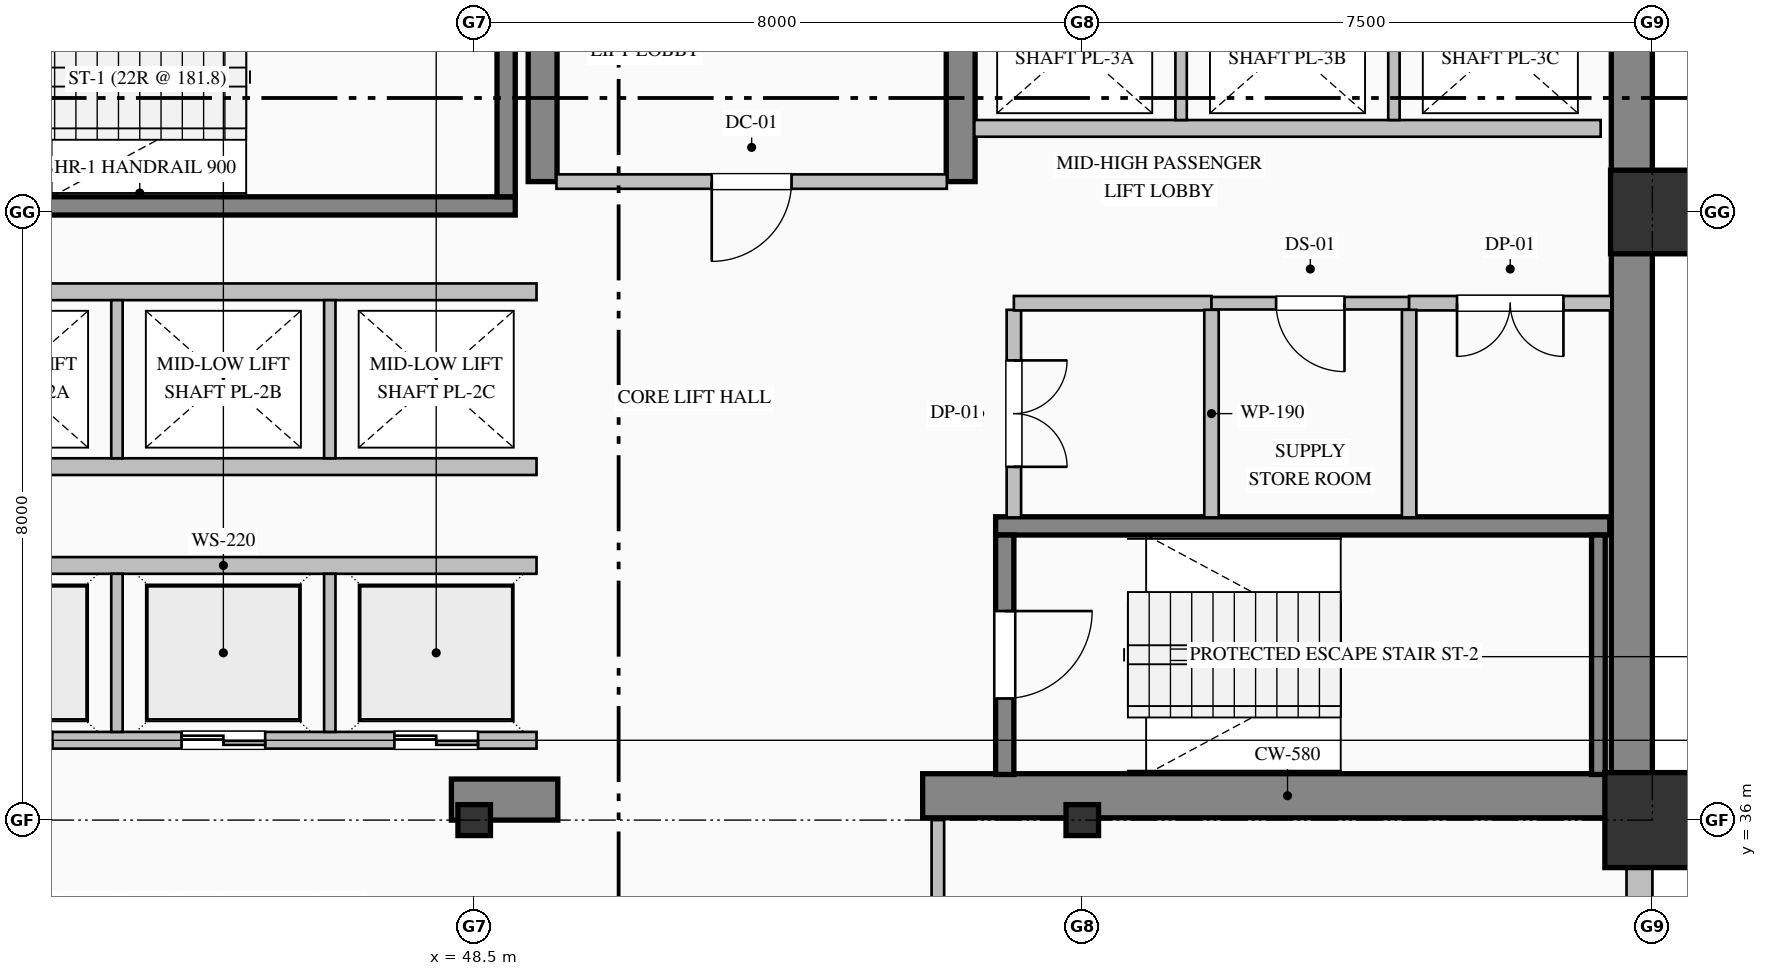
"""IFC4 building model, lengths in metres.
Left out: names, types, materials, properties, quantities, classifications, styles, units other than length and angle.
Written with IfcOpenShell. Run it as: python <this file> out.ifc"""

import sys

from ifc_helpers import new_model, si_unit, direction, frame, frame_2d, origin, origin_2d, place, context, subcontext, project, spatial, rectangle, hollow_rectangle, i_section, extrude, element, fill, save


model = new_model("IFC4")
c1 = context("Model", 3, precision=1e-05, world=origin(), true_north=direction((0.0, 1.0)))
c2 = subcontext(c1, "Body", "Model", "MODEL_VIEW")
j1 = project(units=[si_unit("LENGTHUNIT", "METRE"), si_unit("PLANEANGLEUNIT", "RADIAN")], contexts=[c1])
p1 = place(None, origin())
s1 = spatial("IfcSite", under=j1, at=p1, CompositionType="ELEMENT")
p2 = place(p1, origin())
s2 = spatial("IfcBuilding", under=s1, at=p2, CompositionType="ELEMENT")
p3 = place(p2, frame((0.0, 0.0, 44.2)))
s3 = spatial("IfcBuildingStorey", under=s2, at=p3, CompositionType="ELEMENT", Elevation=44.2)
p4 = place(p3, frame((63.73, 36.32, 0.0), z_axis=(0.0, 0.0, 1.0), x_axis=(0.0, 1.0, 0.0)))
e1 = element("IfcWall", 1, at=p4, inside=s3, PredefinedType="SHEAR", context=c2, shape_type="SweptSolid", body=[
    extrude(rectangle(XDim=15.14, YDim=0.54, at=frame_2d((7.57, 0.0))), origin(), (0.0, 0.0, 1.0), 3.75),
])
p5 = place(p3, frame((48.2, 36.27, 0.0), z_axis=(0.0, 0.0, 1.0), x_axis=(1.0, 0.0, 0.0)))
e2 = element("IfcWall", 2, at=p5, inside=s3, PredefinedType="SHEAR", context=c2, shape_type="SweptSolid", body=[
    extrude(rectangle(XDim=1.4, YDim=0.54, at=frame_2d((0.7, 0.0))), origin(), (0.0, 0.0, 1.0), 3.75),
])
p6 = place(p3, frame((54.4, 36.32, 0.0), z_axis=(0.0, 0.0, 1.0), x_axis=(1.0, 0.0, 0.0)))
e3 = element("IfcWall", 3, at=p6, inside=s3, PredefinedType="SHEAR", context=c2, shape_type="SweptSolid", body=[
    extrude(rectangle(XDim=9.6, YDim=0.58, at=frame_2d((4.8, 0.0))), origin(), (0.0, 0.0, 1.0), 4.0),
])
p7 = place(p3, frame((49.4, 44.4, 0.0), z_axis=(0.0, 0.0, 1.0), x_axis=(0.0, 1.0, 0.0)))
e4 = element("IfcWall", 4, at=p7, inside=s3, PredefinedType="SHEAR", context=c2, shape_type="SweptSolid", body=[
    extrude(rectangle(XDim=3.0, YDim=0.38, at=frame_2d((1.5, 0.0))), origin(), (0.0, 0.0, 1.0), 3.75),
])
p8 = place(p3, frame((54.9, 44.4, 0.0), z_axis=(0.0, 0.0, 1.0), x_axis=(0.0, 1.0, 0.0)))
e5 = element("IfcWall", 5, at=p8, inside=s3, PredefinedType="SHEAR", context=c2, shape_type="SweptSolid", body=[
    extrude(rectangle(XDim=7.06, YDim=0.38, at=frame_2d((3.53, 0.0))), origin(), (0.0, 0.0, 1.0), 3.75),
])
for number, where, z_axis, x_axis in (
    (6, (48.5, 36.0, 0.0), (0.0, 0.0, 1.0), (1.0, 0.0, 0.0)),
    (7, (56.5, 36.0, 0.0), (0.0, 0.0, 1.0), (1.0, 0.0, 0.0)),
):
    element("IfcColumn", number, at=place(p3, frame(where, z_axis=z_axis, x_axis=x_axis)), inside=s3, PredefinedType="COLUMN", context=c2, shape_type="SweptSolid", body=[
        extrude(i_section(OverallWidth=0.407, OverallDepth=0.428, WebThickness=0.02, FlangeThickness=0.035, FilletRadius=0.022, at=origin_2d()), origin(), (0.0, 0.0, 1.0), 4.0),
    ])
p9 = place(p3, frame((64.0, 36.0, 0.0), z_axis=(0.0, 0.0, 1.0), x_axis=(1.0, 0.0, 0.0)))
e8 = element("IfcColumn", 8, at=p9, inside=s3, PredefinedType="COLUMN", context=c2, shape_type="SweptSolid", body=[
    extrude(hollow_rectangle(XDim=1.25, YDim=1.25, WallThickness=0.045, at=origin_2d()), origin(), (0.0, 0.0, 1.0), 4.0),
])
p10 = place(p3, frame((64.0, 44.0, 0.0), z_axis=(0.0, 0.0, 1.0), x_axis=(1.0, 0.0, 0.0)))
e9 = element("IfcColumn", 9, at=p10, inside=s3, PredefinedType="COLUMN", context=c2, shape_type="SweptSolid", body=[
    extrude(hollow_rectangle(XDim=1.1, YDim=1.1, WallThickness=0.04, at=origin_2d()), origin(), (0.0, 0.0, 1.0), 4.0),
])
p11 = place(p3, frame((63.83, 36.05, 0.0), z_axis=(0.0, 0.0, 1.0), x_axis=(0.0, -1.0, 0.0)))
e10 = element("IfcWall", 10, at=p11, inside=s3, PredefinedType="SOLIDWALL", context=c2, shape_type="SweptSolid", body=[
    extrude(rectangle(XDim=28.05, YDim=0.34, at=frame_2d((14.025, 0.0))), origin(), (0.0, 0.0, 1.0), 3.25),
])
p12 = place(p11, frame((2.55, 0.0, 0.85)))
e11 = element("IfcOpeningElement", 11, at=p12, cuts=e10, PredefinedType="OPENING", context=c2, shape_type="SweptSolid", body=[
    extrude(rectangle(XDim=2.1, YDim=2.05, at=frame_2d((1.05, 1.025))), frame((0.0, 0.18, 0.0), z_axis=(0.0, -1.0, 0.0), x_axis=(1.0, 0.0, 0.0)), (0.0, 0.0, 1.0), 0.36),
])
p13 = place(p11, frame((9.9, 0.0, 0.85)))
e12 = element("IfcOpeningElement", 12, at=p13, cuts=e10, PredefinedType="OPENING", context=c2, shape_type="SweptSolid", body=[
    extrude(rectangle(XDim=1.8, YDim=2.05, at=frame_2d((0.9, 1.025))), frame((0.0, 0.18, 0.0), z_axis=(0.0, -1.0, 0.0), x_axis=(1.0, 0.0, 0.0)), (0.0, 0.0, 1.0), 0.36),
])
p14 = place(p11, frame((13.35, 0.0, 0.85)))
e13 = element("IfcOpeningElement", 13, at=p14, cuts=e10, PredefinedType="OPENING", context=c2, shape_type="SweptSolid", body=[
    extrude(rectangle(XDim=2.1, YDim=2.05, at=frame_2d((1.05, 1.025))), frame((0.0, 0.18, 0.0), z_axis=(0.0, -1.0, 0.0), x_axis=(1.0, 0.0, 0.0)), (0.0, 0.0, 1.0), 0.36),
])
p15 = place(p3, frame((49.04, 44.08, 0.0), z_axis=(0.0, 0.0, 1.0), x_axis=(-1.0, 0.0, 0.0)))
e14 = element("IfcWall", 14, at=p15, inside=s3, PredefinedType="SOLIDWALL", context=c2, shape_type="SweptSolid", body=[
    extrude(rectangle(XDim=8.08, YDim=0.24, at=frame_2d((4.04, 0.0))), origin(), (0.0, 0.0, 1.0), 4.0),
])
p16 = place(p3, frame((48.92, 44.2, 0.0), z_axis=(0.0, 0.0, 1.0), x_axis=(0.0, 1.0, 0.0)))
e15 = element("IfcWall", 15, at=p16, inside=s3, PredefinedType="SOLIDWALL", context=c2, shape_type="SweptSolid", body=[
    extrude(rectangle(XDim=3.15, YDim=0.24, at=frame_2d((1.575, 0.0))), origin(), (0.0, 0.0, 1.0), 4.0),
])
p17 = place(p3, frame((55.36, 39.87, 0.0), z_axis=(0.0, 0.0, 1.0), x_axis=(1.0, 0.0, 0.0)))
e16 = element("IfcWall", 16, at=p17, inside=s3, PredefinedType="SOLIDWALL", context=c2, shape_type="SweptSolid", body=[
    extrude(rectangle(XDim=8.08, YDim=0.24, at=frame_2d((4.04, 0.0))), origin(), (0.0, 0.0, 1.0), 4.0),
])
p18 = place(p3, frame((55.48, 39.75, 0.0), z_axis=(0.0, 0.0, 1.0), x_axis=(0.0, -1.0, 0.0)))
e17 = element("IfcWall", 17, at=p18, inside=s3, PredefinedType="SOLIDWALL", context=c2, shape_type="SweptSolid", body=[
    extrude(rectangle(XDim=3.15, YDim=0.24, at=frame_2d((1.575, 0.0))), origin(), (0.0, 0.0, 1.0), 4.0),
])
p19 = place(p18, frame((1.0, 0.0, 0.0)))
e18 = element("IfcOpeningElement", 18, at=p19, cuts=e17, PredefinedType="OPENING", context=c2, shape_type="SweptSolid", body=[
    extrude(rectangle(XDim=1.15, YDim=2.2, at=frame_2d((0.575, 1.1))), frame((0.0, 0.13, 0.0), z_axis=(0.0, -1.0, 0.0), x_axis=(1.0, 0.0, 0.0)), (0.0, 0.0, 1.0), 0.26),
])
p20 = place(p3, frame((63.29, 36.6, 0.0), z_axis=(0.0, 0.0, 1.0), x_axis=(0.0, 1.0, 0.0)))
e19 = element("IfcWall", 19, at=p20, inside=s3, PredefinedType="SOLIDWALL", context=c2, shape_type="SweptSolid", body=[
    extrude(rectangle(XDim=3.15, YDim=0.18, at=frame_2d((1.575, 0.0))), origin(), (0.0, 0.0, 1.0), 4.0),
])
p21 = place(p3, frame((49.32, 37.05, 0.0), z_axis=(0.0, 0.0, 1.0), x_axis=(-1.0, 0.0, 0.0)))
e20 = element("IfcWall", 20, at=p21, inside=s3, PredefinedType="PARTITIONING", context=c2, shape_type="SweptSolid", body=[
    extrude(rectangle(XDim=8.24, YDim=0.22, at=frame_2d((4.12, 0.0))), origin(), (0.0, 0.0, 1.0), 3.75),
])
p22 = place(p21, frame((6.37, 0.0, 0.0)))
e21 = element("IfcOpeningElement", 21, at=p22, cuts=e20, PredefinedType="OPENING", context=c2, shape_type="SweptSolid", body=[
    extrude(rectangle(XDim=1.1, YDim=2.2, at=frame_2d((0.55, 1.1))), frame((0.0, 0.12, 0.0), z_axis=(0.0, -1.0, 0.0), x_axis=(1.0, 0.0, 0.0)), (0.0, 0.0, 1.0), 0.24),
])
p23 = place(p21, frame((3.57, 0.0, 0.0)))
e22 = element("IfcOpeningElement", 22, at=p23, cuts=e20, PredefinedType="OPENING", context=c2, shape_type="SweptSolid", body=[
    extrude(rectangle(XDim=1.1, YDim=2.2, at=frame_2d((0.55, 1.1))), frame((0.0, 0.12, 0.0), z_axis=(0.0, -1.0, 0.0), x_axis=(1.0, 0.0, 0.0)), (0.0, 0.0, 1.0), 0.24),
])
p24 = place(p21, frame((0.77, 0.0, 0.0)))
e23 = element("IfcOpeningElement", 23, at=p24, cuts=e20, PredefinedType="OPENING", context=c2, shape_type="SweptSolid", body=[
    extrude(rectangle(XDim=1.1, YDim=2.2, at=frame_2d((0.55, 1.1))), frame((0.0, 0.12, 0.0), z_axis=(0.0, -1.0, 0.0), x_axis=(1.0, 0.0, 0.0)), (0.0, 0.0, 1.0), 0.24),
])
p25 = place(p3, frame((41.08, 39.35, 0.0), z_axis=(0.0, 0.0, 1.0), x_axis=(1.0, 0.0, 0.0)))
e24 = element("IfcWall", 24, at=p25, inside=s3, PredefinedType="PARTITIONING", context=c2, shape_type="SweptSolid", body=[
    extrude(rectangle(XDim=8.24, YDim=0.22, at=frame_2d((4.12, 0.0))), origin(), (0.0, 0.0, 1.0), 3.75),
])
for number, where, z_axis, x_axis in (
    (25, (43.8, 37.16, 0.0), (0.0, 0.0, 1.0), (0.0, 1.0, 0.0)),
    (26, (46.6, 37.16, 0.0), (0.0, 0.0, 1.0), (0.0, 1.0, 0.0)),
):
    element("IfcWall", number, at=place(p3, frame(where, z_axis=z_axis, x_axis=x_axis)), inside=s3, PredefinedType="PARTITIONING", context=c2, shape_type="SweptSolid", body=[
        extrude(rectangle(XDim=2.08, YDim=0.15, at=frame_2d((1.04, 0.0))), origin(), (0.0, 0.0, 1.0), 3.75),
    ])
for number, where, z_axis, x_axis in (
    (27, (49.32, 40.65, 0.0), (0.0, 0.0, 1.0), (-1.0, 0.0, 0.0)),
    (28, (41.08, 42.95, 0.0), (0.0, 0.0, 1.0), (1.0, 0.0, 0.0)),
):
    element("IfcWall", number, at=place(p3, frame(where, z_axis=z_axis, x_axis=x_axis)), inside=s3, PredefinedType="PARTITIONING", context=c2, shape_type="SweptSolid", body=[
        extrude(rectangle(XDim=8.24, YDim=0.22, at=frame_2d((4.12, 0.0))), origin(), (0.0, 0.0, 1.0), 3.75),
    ])
for number, where, z_axis, x_axis in (
    (29, (43.8, 40.76, 0.0), (0.0, 0.0, 1.0), (0.0, 1.0, 0.0)),
    (30, (46.6, 40.76, 0.0), (0.0, 0.0, 1.0), (0.0, 1.0, 0.0)),
):
    element("IfcWall", number, at=place(p3, frame(where, z_axis=z_axis, x_axis=x_axis)), inside=s3, PredefinedType="PARTITIONING", context=c2, shape_type="SweptSolid", body=[
        extrude(rectangle(XDim=2.08, YDim=0.15, at=frame_2d((1.04, 0.0))), origin(), (0.0, 0.0, 1.0), 3.75),
    ])
p26 = place(p3, frame((63.32, 45.1, 0.0), z_axis=(0.0, 0.0, 1.0), x_axis=(-1.0, 0.0, 0.0)))
e31 = element("IfcWall", 31, at=p26, inside=s3, PredefinedType="PARTITIONING", context=c2, shape_type="SweptSolid", body=[
    extrude(rectangle(XDim=8.24, YDim=0.22, at=frame_2d((4.12, 0.0))), origin(), (0.0, 0.0, 1.0), 3.75),
])
for number, where, z_axis, x_axis in (
    (32, (57.8, 45.21, 0.0), (0.0, 0.0, 1.0), (0.0, 1.0, 0.0)),
    (33, (60.6, 45.21, 0.0), (0.0, 0.0, 1.0), (0.0, 1.0, 0.0)),
):
    element("IfcWall", number, at=place(p3, frame(where, z_axis=z_axis, x_axis=x_axis)), inside=s3, PredefinedType="PARTITIONING", context=c2, shape_type="SweptSolid", body=[
        extrude(rectangle(XDim=2.03, YDim=0.15, at=frame_2d((1.015, 0.0))), origin(), (0.0, 0.0, 1.0), 3.75),
    ])
p27 = place(p3, frame((54.718, 44.4, 0.0), z_axis=(0.0, 0.0, 1.0), x_axis=(-1.0, 0.0, 0.0)))
e34 = element("IfcWall", 34, at=p27, inside=s3, PredefinedType="PARTITIONING", context=c2, shape_type="SweptSolid", body=[
    extrude(rectangle(XDim=5.136, YDim=0.19, at=frame_2d((2.568, 0.0))), origin(), (0.0, 0.0, 1.0), 3.75),
])
p28 = place(p27, frame((2.043, 0.0, 0.0)))
e35 = element("IfcOpeningElement", 35, at=p28, cuts=e34, PredefinedType="OPENING", context=c2, shape_type="SweptSolid", body=[
    extrude(rectangle(XDim=1.05, YDim=2.15, at=frame_2d((0.525, 1.075))), frame((0.0, 0.105, 0.0), z_axis=(0.0, -1.0, 0.0), x_axis=(1.0, 0.0, 0.0)), (0.0, 0.0, 1.0), 0.21),
])
p29 = place(p3, frame((55.6, 42.713, 0.0), z_axis=(0.0, 0.0, 1.0), x_axis=(0.0, -1.0, 0.0)))
e36 = element("IfcWall", 36, at=p29, inside=s3, PredefinedType="PARTITIONING", context=c2, shape_type="SweptSolid", body=[
    extrude(rectangle(XDim=2.731, YDim=0.19, at=frame_2d((1.365, 0.0))), origin(), (0.0, 0.0, 1.0), 3.75),
])
p30 = place(p29, frame((0.666, 0.0, 0.0)))
e37 = element("IfcOpeningElement", 37, at=p30, cuts=e36, PredefinedType="OPENING", context=c2, shape_type="SweptSolid", body=[
    extrude(rectangle(XDim=1.4, YDim=2.25, at=frame_2d((0.7, 1.125))), frame((0.0, 0.105, 0.0), z_axis=(0.0, -1.0, 0.0), x_axis=(1.0, 0.0, 0.0)), (0.0, 0.0, 1.0), 0.21),
])
p31 = place(p3, frame((58.2, 42.8, 0.0), z_axis=(0.0, 0.0, 1.0), x_axis=(-1.0, 0.0, 0.0)))
e38 = element("IfcWall", 38, at=p31, inside=s3, PredefinedType="PARTITIONING", context=c2, shape_type="SweptSolid", body=[
    extrude(rectangle(XDim=2.6, YDim=0.19, at=frame_2d((1.3, 0.0))), origin(), (0.0, 0.0, 1.0), 3.75),
])
p32 = place(p3, frame((60.8, 42.8, 0.0), z_axis=(0.0, 0.0, 1.0), x_axis=(-1.0, 0.0, 0.0)))
e39 = element("IfcWall", 39, at=p32, inside=s3, PredefinedType="PARTITIONING", context=c2, shape_type="SweptSolid", body=[
    extrude(rectangle(XDim=2.6, YDim=0.165, at=frame_2d((1.3, 0.0))), origin(), (0.0, 0.0, 1.0), 3.75),
])
p33 = place(p32, frame((0.85, 0.0, 0.0)))
e40 = element("IfcOpeningElement", 40, at=p33, cuts=e39, PredefinedType="OPENING", context=c2, shape_type="SweptSolid", body=[
    extrude(rectangle(XDim=0.9, YDim=2.15, at=frame_2d((0.45, 1.075))), frame((0.0, 0.093, 0.0), z_axis=(0.0, -1.0, 0.0), x_axis=(1.0, 0.0, 0.0)), (0.0, 0.0, 1.0), 0.185),
])
p34 = place(p3, frame((63.46, 42.8, 0.0), z_axis=(0.0, 0.0, 1.0), x_axis=(-1.0, 0.0, 0.0)))
e41 = element("IfcWall", 41, at=p34, inside=s3, PredefinedType="PARTITIONING", context=c2, shape_type="SweptSolid", body=[
    extrude(rectangle(XDim=2.66, YDim=0.19, at=frame_2d((1.33, 0.0))), origin(), (0.0, 0.0, 1.0), 3.75),
])
p35 = place(p34, frame((0.63, 0.0, 0.0)))
e42 = element("IfcOpeningElement", 42, at=p35, cuts=e41, PredefinedType="OPENING", context=c2, shape_type="SweptSolid", body=[
    extrude(rectangle(XDim=1.4, YDim=2.25, at=frame_2d((0.7, 1.125))), frame((0.0, 0.105, 0.0), z_axis=(0.0, -1.0, 0.0), x_axis=(1.0, 0.0, 0.0)), (0.0, 0.0, 1.0), 0.21),
])
for number, where, z_axis, x_axis in (
    (43, (58.2, 42.713, 0.0), (0.0, 0.0, 1.0), (0.0, -1.0, 0.0)),
    (44, (60.8, 42.713, 0.0), (0.0, 0.0, 1.0), (0.0, -1.0, 0.0)),
):
    element("IfcWall", number, at=place(p3, frame(where, z_axis=z_axis, x_axis=x_axis)), inside=s3, PredefinedType="PARTITIONING", context=c2, shape_type="SweptSolid", body=[
        extrude(rectangle(XDim=2.731, YDim=0.19, at=frame_2d((1.365, 0.0))), origin(), (0.0, 0.0, 1.0), 3.75),
    ])
p36 = place(p3, frame((54.6, 36.0, 0.0), z_axis=(0.0, 0.0, 1.0), x_axis=(0.0, -1.0, 0.0)))
e45 = element("IfcWall", 45, at=p36, inside=s3, PredefinedType="PARTITIONING", context=c2, shape_type="SweptSolid", body=[
    extrude(rectangle(XDim=2.125, YDim=0.165, at=frame_2d((1.063, 0.0))), origin(), (0.0, 0.0, 1.0), 3.75),
])
p37 = place(p19, origin())
e46 = element("IfcDoor", 46, at=p37, inside=s3, OperationType="SINGLE_SWING_LEFT", PredefinedType="DOOR", context=c2, shape_type="SweptSolid", body=[
    extrude(rectangle(XDim=1.15, YDim=2.2, at=frame_2d((0.575, 1.1))), frame((0.0, 0.025, 0.0), z_axis=(0.0, -1.0, 0.0), x_axis=(1.0, 0.0, 0.0)), (0.0, 0.0, 1.0), 0.05),
])
fill(e18, e46)
p38 = place(p23, origin())
e47 = element("IfcDoor", 47, at=p38, inside=s3, OperationType="DOUBLE_DOOR_SLIDING", PredefinedType="DOOR", context=c2, shape_type="SweptSolid", body=[
    extrude(rectangle(XDim=1.1, YDim=2.2, at=frame_2d((0.55, 1.1))), frame((0.0, 0.025, 0.0), z_axis=(0.0, -1.0, 0.0), x_axis=(1.0, 0.0, 0.0)), (0.0, 0.0, 1.0), 0.05),
])
fill(e22, e47)
p39 = place(p24, origin())
e48 = element("IfcDoor", 48, at=p39, inside=s3, OperationType="DOUBLE_DOOR_SLIDING", PredefinedType="DOOR", context=c2, shape_type="SweptSolid", body=[
    extrude(rectangle(XDim=1.1, YDim=2.2, at=frame_2d((0.55, 1.1))), frame((0.0, 0.025, 0.0), z_axis=(0.0, -1.0, 0.0), x_axis=(1.0, 0.0, 0.0)), (0.0, 0.0, 1.0), 0.05),
])
fill(e23, e48)
p40 = place(p28, origin())
e49 = element("IfcDoor", 49, at=p40, inside=s3, OperationType="SINGLE_SWING_RIGHT", PredefinedType="DOOR", context=c2, shape_type="SweptSolid", body=[
    extrude(rectangle(XDim=1.05, YDim=2.15, at=frame_2d((0.525, 1.075))), frame((0.0, 0.025, 0.0), z_axis=(0.0, -1.0, 0.0), x_axis=(1.0, 0.0, 0.0)), (0.0, 0.0, 1.0), 0.05),
])
fill(e35, e49)
p41 = place(p30, origin())
e50 = element("IfcDoor", 50, at=p41, inside=s3, OperationType="DOUBLE_DOOR_SINGLE_SWING", PredefinedType="DOOR", context=c2, shape_type="SweptSolid", body=[
    extrude(rectangle(XDim=1.4, YDim=2.25, at=frame_2d((0.7, 1.125))), frame((0.0, 0.025, 0.0), z_axis=(0.0, -1.0, 0.0), x_axis=(1.0, 0.0, 0.0)), (0.0, 0.0, 1.0), 0.05),
])
fill(e37, e50)
p42 = place(p33, origin())
e51 = element("IfcDoor", 51, at=p42, inside=s3, OperationType="SINGLE_SWING_LEFT", PredefinedType="DOOR", context=c2, shape_type="SweptSolid", body=[
    extrude(rectangle(XDim=0.9, YDim=2.15, at=frame_2d((0.45, 1.075))), frame((0.0, 0.025, 0.0), z_axis=(0.0, -1.0, 0.0), x_axis=(1.0, 0.0, 0.0)), (0.0, 0.0, 1.0), 0.05),
])
fill(e40, e51)
p43 = place(p35, origin())
e52 = element("IfcDoor", 52, at=p43, inside=s3, OperationType="DOUBLE_DOOR_SINGLE_SWING", PredefinedType="DOOR", context=c2, shape_type="SweptSolid", body=[
    extrude(rectangle(XDim=1.4, YDim=2.25, at=frame_2d((0.7, 1.125))), frame((0.0, 0.025, 0.0), z_axis=(0.0, -1.0, 0.0), x_axis=(1.0, 0.0, 0.0)), (0.0, 0.0, 1.0), 0.05),
])
fill(e42, e52)
save(model, sys.argv[1])
